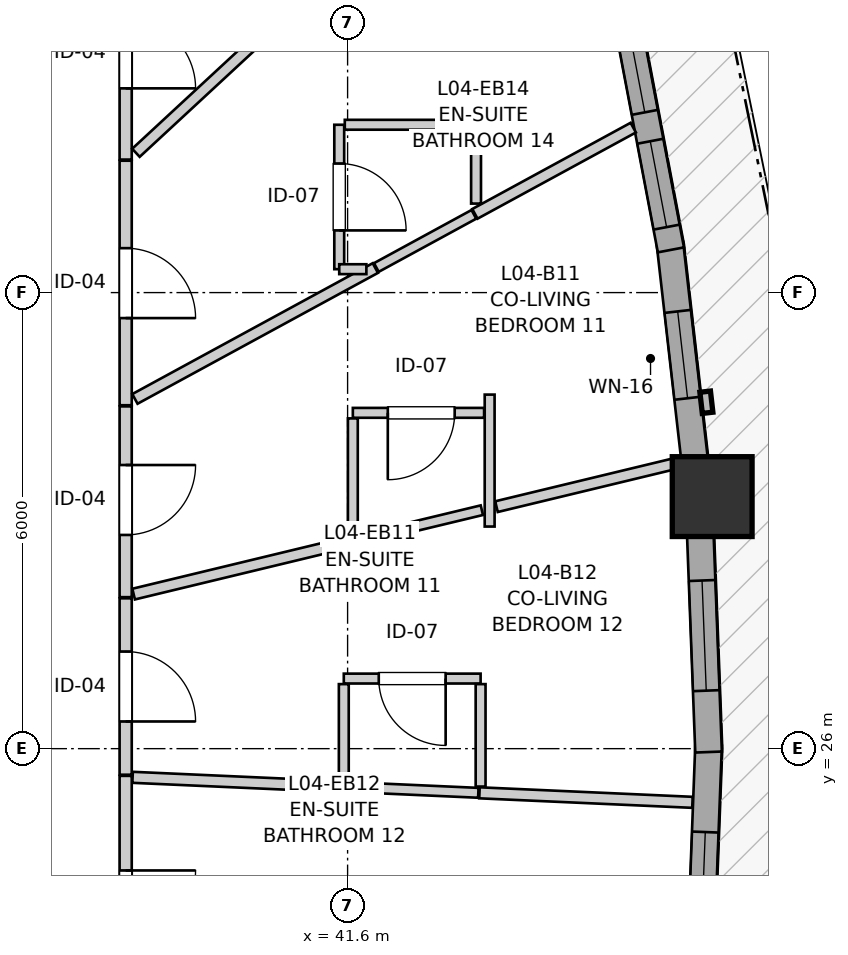
"""IFC4 building model, lengths in metres.
Left out: names, types, materials, properties, quantities, classifications, styles, units other than length and angle.
Written with IfcOpenShell. Run it as: python <this file> out.ifc"""

import sys

from ifc_helpers import new_model, si_unit, direction, frame, frame_2d, origin, origin_2d, place, context, subcontext, project, spatial, rectangle, extrude, source, transform, mapped, element, fill, save


model = new_model("IFC4")
c1 = context("Model", 3, precision=1e-05, world=origin(), true_north=direction((0.0, 1.0)))
c2 = subcontext(c1, "Body", "Model", "MODEL_VIEW")
j1 = project(units=[si_unit("LENGTHUNIT", "METRE"), si_unit("PLANEANGLEUNIT", "RADIAN")], contexts=[c1])
p1 = place(None, origin())
s1 = spatial("IfcSite", under=j1, at=p1, CompositionType="ELEMENT")
p2 = place(p1, origin())
s2 = spatial("IfcBuilding", under=s1, at=p2, CompositionType="ELEMENT")
p3 = place(p2, frame((0.0, 0.0, 17.4)))
s3 = spatial("IfcBuildingStorey", under=s2, at=p3, CompositionType="ELEMENT", Elevation=17.4)
m1 = source(origin(), c2, "Body", "SweptSolid", [
    extrude(rectangle(XDim=1.05, YDim=1.05, at=origin_2d()), origin(), (0.0, 0.0, 1.0), 2.94),
])
p4 = place(p3, frame((46.397, 29.316, 0.0), z_axis=(0.0, 0.0, 1.0), x_axis=(1.0, 0.0, 0.0)))
e1 = element("IfcColumn", 1, at=p4, inside=s3, PredefinedType="COLUMN", context=c2, shape_type="MappedRepresentation", body=[
    mapped(m1, transform((0.0, 0.0, 0.0), x_axis=(1.0, 0.0, 0.0), y_axis=(0.0, 1.0, 0.0), z_axis=(0.0, 0.0, 1.0), scale=1.0)),
])
p5 = place(p3, frame((46.223, 22.711, 0.0), z_axis=(0.0, 0.0, 1.0), x_axis=(0.037977854684, 0.999278581054, 0.0)))
e2 = element("IfcWall", 2, at=p5, inside=s3, PredefinedType="SOLIDWALL", context=c2, shape_type="SweptSolid", body=[
    extrude(rectangle(XDim=3.336, YDim=0.35, at=frame_2d((1.668, 0.0))), origin(), (0.0, 0.0, 1.0), 2.42),
])
p6 = place(p5, frame((0.444, 0.0, 0.82)))
e3 = element("IfcOpeningElement", 3, at=p6, cuts=e2, PredefinedType="OPENING", context=c2, shape_type="SweptSolid", body=[
    extrude(rectangle(XDim=1.75, YDim=1.3, at=frame_2d((0.875, 0.65))), frame((0.0, 0.185, 0.0), z_axis=(0.0, -1.0, 0.0), x_axis=(1.0, 0.0, 0.0)), (0.0, 0.0, 1.0), 0.37),
])
p7 = place(p3, frame((46.349, 25.955, 0.0), z_axis=(0.0, 0.0, 1.0), x_axis=(-0.038022046735, 0.999276900545, 0.0)))
e4 = element("IfcWall", 4, at=p7, inside=s3, PredefinedType="SOLIDWALL", context=c2, shape_type="SweptSolid", body=[
    extrude(rectangle(XDim=3.056, YDim=0.35, at=frame_2d((1.528, 0.0))), origin(), (0.0, 0.0, 1.0), 2.42),
])
p8 = place(p7, frame((0.808, 0.0, 0.82)))
e5 = element("IfcOpeningElement", 5, at=p8, cuts=e4, PredefinedType="OPENING", context=c2, shape_type="SweptSolid", body=[
    extrude(rectangle(XDim=1.45, YDim=1.25, at=frame_2d((0.725, 0.625))), frame((0.0, 0.185, 0.0), z_axis=(0.0, -1.0, 0.0), x_axis=(1.0, 0.0, 0.0)), (0.0, 0.0, 1.0), 0.37),
])
p9 = place(p3, frame((46.189, 29.594, 0.0), z_axis=(0.0, 0.0, 1.0), x_axis=(-0.113201797404, 0.99357201705, 0.0)))
e6 = element("IfcWall", 6, at=p9, inside=s3, PredefinedType="SOLIDWALL", context=c2, shape_type="SweptSolid", body=[
    extrude(rectangle(XDim=3.075, YDim=0.35, at=frame_2d((1.538, 0.0))), origin(), (0.0, 0.0, 1.0), 2.42),
])
p10 = place(p9, frame((1.022, 0.0, 0.82)))
e7 = element("IfcOpeningElement", 7, at=p10, cuts=e6, PredefinedType="OPENING", context=c2, shape_type="SweptSolid", body=[
    extrude(rectangle(XDim=1.15, YDim=1.2, at=frame_2d((0.575, 0.6))), frame((0.0, 0.185, 0.0), z_axis=(0.0, -1.0, 0.0), x_axis=(1.0, 0.0, 0.0)), (0.0, 0.0, 1.0), 0.37),
])
p11 = place(p3, frame((45.854, 32.562, 0.0), z_axis=(0.0, 0.0, 1.0), x_axis=(-0.186698837055, 0.982417194598, 0.0)))
e8 = element("IfcWall", 8, at=p11, inside=s3, PredefinedType="SOLIDWALL", context=c2, shape_type="SweptSolid", body=[
    extrude(rectangle(XDim=3.393, YDim=0.35, at=frame_2d((1.697, 0.0))), origin(), (0.0, 0.0, 1.0), 2.42),
])
p12 = place(p11, frame((0.305, 0.0, 0.82)))
e9 = element("IfcOpeningElement", 9, at=p12, cuts=e8, PredefinedType="OPENING", context=c2, shape_type="SweptSolid", body=[
    extrude(rectangle(XDim=1.15, YDim=1.2, at=frame_2d((0.575, 0.6))), frame((0.0, 0.185, 0.0), z_axis=(0.0, -1.0, 0.0), x_axis=(1.0, 0.0, 0.0)), (0.0, 0.0, 1.0), 0.37),
])
p13 = place(p11, frame((1.842, 0.0, 0.82)))
e10 = element("IfcOpeningElement", 10, at=p13, cuts=e8, PredefinedType="OPENING", context=c2, shape_type="SweptSolid", body=[
    extrude(rectangle(XDim=1.25, YDim=1.35, at=frame_2d((0.625, 0.675))), frame((0.0, 0.185, 0.0), z_axis=(0.0, -1.0, 0.0), x_axis=(1.0, 0.0, 0.0)), (0.0, 0.0, 1.0), 0.37),
])
p14 = place(p3, frame((38.68, 25.642, 0.0), z_axis=(0.0, 0.0, 1.0), x_axis=(0.0, -1.0, 0.0)))
e11 = element("IfcWall", 11, at=p14, inside=s3, PredefinedType="PARTITIONING", context=c2, shape_type="SweptSolid", body=[
    extrude(rectangle(XDim=3.363, YDim=0.16, at=frame_2d((1.682, 0.0))), origin(), (0.0, 0.0, 1.0), 2.94),
])
p15 = place(p14, frame((1.244, 0.0, 0.0)))
e12 = element("IfcOpeningElement", 12, at=p15, cuts=e11, PredefinedType="OPENING", context=c2, shape_type="SweptSolid", body=[
    extrude(rectangle(XDim=0.92, YDim=2.1, at=frame_2d((0.46, 1.05))), frame((0.0, 0.09, 0.0), z_axis=(0.0, -1.0, 0.0), x_axis=(1.0, 0.0, 0.0)), (0.0, 0.0, 1.0), 0.18),
])
p16 = place(p3, frame((38.68, 33.735, 0.0), z_axis=(0.0, 0.0, 1.0), x_axis=(0.0, -1.0, 0.0)))
e13 = element("IfcWall", 13, at=p16, inside=s3, PredefinedType="PARTITIONING", context=c2, shape_type="SweptSolid", body=[
    extrude(rectangle(XDim=3.217, YDim=0.16, at=frame_2d((1.608, 0.0))), origin(), (0.0, 0.0, 1.0), 2.94),
])
p17 = place(p16, frame((1.15, 0.0, 0.0)))
e14 = element("IfcOpeningElement", 14, at=p17, cuts=e13, PredefinedType="OPENING", context=c2, shape_type="SweptSolid", body=[
    extrude(rectangle(XDim=0.92, YDim=2.1, at=frame_2d((0.46, 1.05))), frame((0.0, 0.09, 0.0), z_axis=(0.0, -1.0, 0.0), x_axis=(1.0, 0.0, 0.0)), (0.0, 0.0, 1.0), 0.18),
])
p18 = place(p3, frame((38.68, 36.58, 0.0), z_axis=(0.0, 0.0, 1.0), x_axis=(0.0, -1.0, 0.0)))
e15 = element("IfcWall", 15, at=p18, inside=s3, PredefinedType="PARTITIONING", context=c2, shape_type="SweptSolid", body=[
    extrude(rectangle(XDim=2.83, YDim=0.16, at=frame_2d((1.415, 0.0))), origin(), (0.0, 0.0, 1.0), 2.94),
])
p19 = place(p18, frame((0.973, 0.0, 0.0)))
e16 = element("IfcOpeningElement", 16, at=p19, cuts=e15, PredefinedType="OPENING", context=c2, shape_type="SweptSolid", body=[
    extrude(rectangle(XDim=0.92, YDim=2.1, at=frame_2d((0.46, 1.05))), frame((0.0, 0.09, 0.0), z_axis=(0.0, -1.0, 0.0), x_axis=(1.0, 0.0, 0.0)), (0.0, 0.0, 1.0), 0.18),
])
p20 = place(p3, frame((38.68, 30.503, 0.0), z_axis=(0.0, 0.0, 1.0), x_axis=(0.0, -1.0, 0.0)))
e17 = element("IfcWall", 17, at=p20, inside=s3, PredefinedType="PARTITIONING", context=c2, shape_type="SweptSolid", body=[
    extrude(rectangle(XDim=2.51, YDim=0.16, at=frame_2d((1.255, 0.0))), origin(), (0.0, 0.0, 1.0), 2.94),
])
p21 = place(p20, frame((0.771, 0.0, 0.0)))
e18 = element("IfcOpeningElement", 18, at=p21, cuts=e17, PredefinedType="OPENING", context=c2, shape_type="SweptSolid", body=[
    extrude(rectangle(XDim=0.92, YDim=2.1, at=frame_2d((0.46, 1.05))), frame((0.0, 0.09, 0.0), z_axis=(0.0, -1.0, 0.0), x_axis=(1.0, 0.0, 0.0)), (0.0, 0.0, 1.0), 0.18),
])
p22 = place(p3, frame((38.68, 27.978, 0.0), z_axis=(0.0, 0.0, 1.0), x_axis=(0.0, -1.0, 0.0)))
e19 = element("IfcWall", 19, at=p22, inside=s3, PredefinedType="PARTITIONING", context=c2, shape_type="SweptSolid", body=[
    extrude(rectangle(XDim=2.321, YDim=0.16, at=frame_2d((1.161, 0.0))), origin(), (0.0, 0.0, 1.0), 2.94),
])
p23 = place(p22, frame((0.7, 0.0, 0.0)))
e20 = element("IfcOpeningElement", 20, at=p23, cuts=e19, PredefinedType="OPENING", context=c2, shape_type="SweptSolid", body=[
    extrude(rectangle(XDim=0.92, YDim=2.1, at=frame_2d((0.46, 1.05))), frame((0.0, 0.09, 0.0), z_axis=(0.0, -1.0, 0.0), x_axis=(1.0, 0.0, 0.0)), (0.0, 0.0, 1.0), 0.18),
])
p24 = place(p3, frame((41.49, 34.208, 0.0), z_axis=(0.0, 0.0, 1.0), x_axis=(0.0, -1.0, 0.0)))
e21 = element("IfcWall", 21, at=p24, inside=s3, PredefinedType="PARTITIONING", context=c2, shape_type="SweptSolid", body=[
    extrude(rectangle(XDim=1.9, YDim=0.13, at=frame_2d((0.95, 0.0))), origin(), (0.0, 0.0, 1.0), 2.94),
])
p25 = place(p24, frame((0.51, 0.0, 0.0)))
e22 = element("IfcOpeningElement", 22, at=p25, cuts=e21, PredefinedType="OPENING", context=c2, shape_type="SweptSolid", body=[
    extrude(rectangle(XDim=0.88, YDim=2.05, at=frame_2d((0.44, 1.025))), frame((0.0, 0.075, 0.0), z_axis=(0.0, -1.0, 0.0), x_axis=(1.0, 0.0, 0.0)), (0.0, 0.0, 1.0), 0.15),
])
p26 = place(p3, frame((43.396, 30.418, 0.0), z_axis=(0.0, 0.0, 1.0), x_axis=(-1.0, 0.0, 0.0)))
e23 = element("IfcWall", 23, at=p26, inside=s3, PredefinedType="PARTITIONING", context=c2, shape_type="SweptSolid", body=[
    extrude(rectangle(XDim=1.727, YDim=0.13, at=frame_2d((0.864, 0.0))), origin(), (0.0, 0.0, 1.0), 2.94),
])
p27 = place(p26, frame((0.387, 0.0, 0.0)))
e24 = element("IfcOpeningElement", 24, at=p27, cuts=e23, PredefinedType="OPENING", context=c2, shape_type="SweptSolid", body=[
    extrude(rectangle(XDim=0.88, YDim=2.05, at=frame_2d((0.44, 1.025))), frame((0.0, 0.075, 0.0), z_axis=(0.0, -1.0, 0.0), x_axis=(1.0, 0.0, 0.0)), (0.0, 0.0, 1.0), 0.15),
])
p28 = place(p3, frame((43.35, 26.922, 0.0), z_axis=(0.0, 0.0, 1.0), x_axis=(-1.0, 0.0, 0.0)))
e25 = element("IfcWall", 25, at=p28, inside=s3, PredefinedType="PARTITIONING", context=c2, shape_type="SweptSolid", body=[
    extrude(rectangle(XDim=1.8, YDim=0.13, at=frame_2d((0.9, 0.0))), origin(), (0.0, 0.0, 1.0), 2.94),
])
p29 = place(p28, frame((0.46, 0.0, 0.0)))
e26 = element("IfcOpeningElement", 26, at=p29, cuts=e25, PredefinedType="OPENING", context=c2, shape_type="SweptSolid", body=[
    extrude(rectangle(XDim=0.88, YDim=2.05, at=frame_2d((0.44, 1.025))), frame((0.0, 0.075, 0.0), z_axis=(0.0, -1.0, 0.0), x_axis=(1.0, 0.0, 0.0)), (0.0, 0.0, 1.0), 0.15),
])
p30 = place(p3, frame((38.815, 33.839, 0.0), z_axis=(0.0, 0.0, 1.0), x_axis=(0.733718730688, 0.67945332749, 0.0)))
e27 = element("IfcWall", 27, at=p30, inside=s3, PredefinedType="PARTITIONING", context=c2, shape_type="SweptSolid", body=[
    extrude(rectangle(XDim=3.869, YDim=0.145, at=frame_2d((1.935, 0.0))), origin(), (0.0, 0.0, 1.0), 2.94),
])
p31 = place(p3, frame((38.802, 30.601, 0.0), z_axis=(0.0, 0.0, 1.0), x_axis=(0.878335610987, 0.478044510973, 0.0)))
e28 = element("IfcWall", 28, at=p31, inside=s3, PredefinedType="PARTITIONING", context=c2, shape_type="SweptSolid", body=[
    extrude(rectangle(XDim=3.602, YDim=0.145, at=frame_2d((1.801, 0.0))), origin(), (0.0, 0.0, 1.0), 2.94),
])
p32 = place(p3, frame((38.785, 28.033, 0.0), z_axis=(0.0, 0.0, 1.0), x_axis=(0.972108739033, 0.234530593943, 0.0)))
e29 = element("IfcWall", 29, at=p32, inside=s3, PredefinedType="PARTITIONING", context=c2, shape_type="SweptSolid", body=[
    extrude(rectangle(XDim=2.967, YDim=0.145, at=frame_2d((1.483, 0.0))), origin(), (0.0, 0.0, 1.0), 2.308),
])
p33 = place(p3, frame((38.771, 25.623, 0.0), z_axis=(0.0, 0.0, 1.0), x_axis=(0.999004404192, -0.044611662199, 0.0)))
e30 = element("IfcWall", 30, at=p33, inside=s3, PredefinedType="PARTITIONING", context=c2, shape_type="SweptSolid", body=[
    extrude(rectangle(XDim=2.796, YDim=0.145, at=frame_2d((1.398, 0.0))), origin(), (0.0, 0.0, 1.0), 2.94),
])
p34 = place(p3, frame((43.335, 25.419, 0.0), z_axis=(0.0, 0.0, 1.0), x_axis=(0.999002708223, -0.04464962444, 0.0)))
e31 = element("IfcWall", 31, at=p34, inside=s3, PredefinedType="PARTITIONING", context=c2, shape_type="SweptSolid", body=[
    extrude(rectangle(XDim=2.805, YDim=0.145, at=frame_2d((1.402, 0.0))), origin(), (0.0, 0.0, 1.0), 2.94),
])
p35 = place(p3, frame((43.559, 29.184, 0.0), z_axis=(0.0, 0.0, 1.0), x_axis=(0.972124665715, 0.23446456941, 0.0)))
e32 = element("IfcWall", 32, at=p35, inside=s3, PredefinedType="PARTITIONING", context=c2, shape_type="SweptSolid", body=[
    extrude(rectangle(XDim=2.487, YDim=0.145, at=frame_2d((1.243, 0.0))), origin(), (0.0, 0.0, 1.0), 2.94),
])
p36 = place(p3, frame((43.275, 33.036, 0.0), z_axis=(0.0, 0.0, 1.0), x_axis=(0.878237509553, 0.478224713721, 0.0)))
e33 = element("IfcWall", 33, at=p36, inside=s3, PredefinedType="PARTITIONING", context=c2, shape_type="SweptSolid", body=[
    extrude(rectangle(XDim=2.372, YDim=0.145, at=frame_2d((1.186, 0.0))), origin(), (0.0, 0.0, 1.0), 2.94),
])
p37 = place(p3, frame((41.684, 28.732, 0.0), z_axis=(0.0, 0.0, 1.0), x_axis=(0.972269386076, 0.233863722924, 0.0)))
e34 = element("IfcWall", 34, at=p37, inside=s3, PredefinedType="PARTITIONING", context=c2, shape_type="SweptSolid", body=[
    extrude(rectangle(XDim=1.731, YDim=0.13, at=frame_2d((0.865, 0.0))), origin(), (0.0, 0.0, 1.0), 2.94),
])
p38 = place(p3, frame((41.563, 34.208, 0.0), z_axis=(0.0, 0.0, 1.0), x_axis=(1.0, 0.0, 0.0)))
e35 = element("IfcWall", 35, at=p38, inside=s3, PredefinedType="PARTITIONING", context=c2, shape_type="SweptSolid", body=[
    extrude(rectangle(XDim=1.727, YDim=0.13, at=frame_2d((0.864, 0.0))), origin(), (0.0, 0.0, 1.0), 2.94),
])
p39 = place(p3, frame((41.58, 25.497, 0.0), z_axis=(0.0, 0.0, 1.0), x_axis=(0.998993531001, -0.04485448715, 0.0)))
e36 = element("IfcWall", 36, at=p39, inside=s3, PredefinedType="PARTITIONING", context=c2, shape_type="SweptSolid", body=[
    extrude(rectangle(XDim=1.742, YDim=0.13, at=frame_2d((0.871, 0.0))), origin(), (0.0, 0.0, 1.0), 2.94),
])
p40 = place(p3, frame((41.669, 28.827, 0.0), z_axis=(0.0, 0.0, 1.0), x_axis=(0.0, 1.0, 0.0)))
e37 = element("IfcWall", 37, at=p40, inside=s3, PredefinedType="PARTITIONING", context=c2, shape_type="SweptSolid", body=[
    extrude(rectangle(XDim=1.518, YDim=0.13, at=frame_2d((0.759, 0.0))), origin(), (0.0, 0.0, 1.0), 2.94),
])
p41 = place(p3, frame((43.35, 25.501, 0.0), z_axis=(0.0, 0.0, 1.0), x_axis=(0.0, 1.0, 0.0)))
e38 = element("IfcWall", 38, at=p41, inside=s3, PredefinedType="PARTITIONING", context=c2, shape_type="SweptSolid", body=[
    extrude(rectangle(XDim=1.348, YDim=0.13, at=frame_2d((0.674, 0.0))), origin(), (0.0, 0.0, 1.0), 2.508),
])
p42 = place(p3, frame((41.978, 32.33, 0.0), z_axis=(0.0, 0.0, 1.0), x_axis=(0.878138043068, 0.478407334097, 0.0)))
e39 = element("IfcWall", 39, at=p42, inside=s3, PredefinedType="PARTITIONING", context=c2, shape_type="SweptSolid", body=[
    extrude(rectangle(XDim=1.462, YDim=0.13, at=frame_2d((0.731, 0.0))), origin(), (0.0, 0.0, 1.0), 2.94),
])
p43 = place(p3, frame((41.55, 25.583, 0.0), z_axis=(0.0, 0.0, 1.0), x_axis=(0.0, 1.0, 0.0)))
e40 = element("IfcWall", 40, at=p43, inside=s3, PredefinedType="PARTITIONING", context=c2, shape_type="SweptSolid", body=[
    extrude(rectangle(XDim=1.267, YDim=0.13, at=frame_2d((0.633, 0.0))), origin(), (0.0, 0.0, 1.0), 2.94),
])
p44 = place(p3, frame((43.469, 28.922, 0.0), z_axis=(0.0, 0.0, 1.0), x_axis=(0.0, 1.0, 0.0)))
e41 = element("IfcWall", 41, at=p44, inside=s3, PredefinedType="PARTITIONING", context=c2, shape_type="SweptSolid", body=[
    extrude(rectangle(XDim=1.736, YDim=0.13, at=frame_2d((0.868, 0.0))), origin(), (0.0, 0.0, 1.0), 2.508),
])
p45 = place(p3, frame((43.29, 33.171, 0.0), z_axis=(0.0, 0.0, 1.0), x_axis=(0.0, 1.0, 0.0)))
e42 = element("IfcWall", 42, at=p45, inside=s3, PredefinedType="PARTITIONING", context=c2, shape_type="SweptSolid", body=[
    extrude(rectangle(XDim=0.964, YDim=0.13, at=frame_2d((0.482, 0.0))), origin(), (0.0, 0.0, 1.0), 2.94),
])
p46 = place(p3, frame((41.49, 32.308, 0.0), z_axis=(0.0, 0.0, 1.0), x_axis=(1.0, 0.0, 0.0)))
e43 = element("IfcWall", 43, at=p46, inside=s3, PredefinedType="PARTITIONING", context=c2, shape_type="SweptSolid", body=[
    extrude(rectangle(XDim=0.357, YDim=0.13, at=frame_2d((0.178, 0.0))), origin(), (0.0, 0.0, 1.0), 2.94),
])
m2 = source(origin(), c2, "Body", "SweptSolid", [
    extrude(rectangle(XDim=1.75, YDim=1.3, at=frame_2d((0.875, 0.65))), frame((0.0, 0.03, 0.0), z_axis=(0.0, -1.0, 0.0), x_axis=(1.0, 0.0, 0.0)), (0.0, 0.0, 1.0), 0.06),
])
p47 = place(p6, origin())
e44 = element("IfcWindow", 44, at=p47, inside=s3, PartitioningType="SINGLE_PANEL", PredefinedType="WINDOW", context=c2, shape_type="MappedRepresentation", body=[
    mapped(m2, transform((0.0, 0.0, 0.0), x_axis=(1.0, 0.0, 0.0), y_axis=(0.0, 1.0, 0.0), z_axis=(0.0, 0.0, 1.0), scale=1.0)),
])
fill(e3, e44)
m3 = source(origin(), c2, "Body", "SweptSolid", [
    extrude(rectangle(XDim=1.45, YDim=1.25, at=frame_2d((0.725, 0.625))), frame((0.0, 0.03, 0.0), z_axis=(0.0, -1.0, 0.0), x_axis=(1.0, 0.0, 0.0)), (0.0, 0.0, 1.0), 0.06),
])
p48 = place(p8, origin())
e45 = element("IfcWindow", 45, at=p48, inside=s3, PartitioningType="SINGLE_PANEL", PredefinedType="WINDOW", context=c2, shape_type="MappedRepresentation", body=[
    mapped(m3, transform((0.0, 0.0, 0.0), x_axis=(1.0, 0.0, 0.0), y_axis=(0.0, 1.0, 0.0), z_axis=(0.0, 0.0, 1.0), scale=1.0)),
])
fill(e5, e45)
m4 = source(origin(), c2, "Body", "SweptSolid", [
    extrude(rectangle(XDim=1.15, YDim=1.2, at=frame_2d((0.575, 0.6))), frame((0.0, 0.03, 0.0), z_axis=(0.0, -1.0, 0.0), x_axis=(1.0, 0.0, 0.0)), (0.0, 0.0, 1.0), 0.06),
])
p49 = place(p10, origin())
e46 = element("IfcWindow", 46, at=p49, inside=s3, PartitioningType="SINGLE_PANEL", PredefinedType="WINDOW", context=c2, shape_type="MappedRepresentation", body=[
    mapped(m4, transform((0.0, 0.0, 0.0), x_axis=(1.0, 0.0, 0.0), y_axis=(0.0, 1.0, 0.0), z_axis=(0.0, 0.0, 1.0), scale=1.0)),
])
fill(e7, e46)
p50 = place(p12, origin())
e47 = element("IfcWindow", 47, at=p50, inside=s3, PartitioningType="SINGLE_PANEL", PredefinedType="WINDOW", context=c2, shape_type="MappedRepresentation", body=[
    mapped(m4, transform((0.0, 0.0, 0.0), x_axis=(1.0, 0.0, 0.0), y_axis=(0.0, 1.0, 0.0), z_axis=(0.0, 0.0, 1.0), scale=1.0)),
])
fill(e9, e47)
m5 = source(origin(), c2, "Body", "SweptSolid", [
    extrude(rectangle(XDim=1.25, YDim=1.35, at=frame_2d((0.625, 0.675))), frame((0.0, 0.03, 0.0), z_axis=(0.0, -1.0, 0.0), x_axis=(1.0, 0.0, 0.0)), (0.0, 0.0, 1.0), 0.06),
])
p51 = place(p13, origin())
e48 = element("IfcWindow", 48, at=p51, inside=s3, PartitioningType="SINGLE_PANEL", PredefinedType="WINDOW", context=c2, shape_type="MappedRepresentation", body=[
    mapped(m5, transform((0.0, 0.0, 0.0), x_axis=(1.0, 0.0, 0.0), y_axis=(0.0, 1.0, 0.0), z_axis=(0.0, 0.0, 1.0), scale=1.0)),
])
fill(e10, e48)
m6 = source(origin(), c2, "Body", "SweptSolid", [
    extrude(rectangle(XDim=0.92, YDim=2.1, at=frame_2d((0.46, 1.05))), frame((0.0, 0.025, 0.0), z_axis=(0.0, -1.0, 0.0), x_axis=(1.0, 0.0, 0.0)), (0.0, 0.0, 1.0), 0.05),
])
p52 = place(p15, origin())
e49 = element("IfcDoor", 49, at=p52, inside=s3, OperationType="SINGLE_SWING_LEFT", PredefinedType="DOOR", context=c2, shape_type="MappedRepresentation", body=[
    mapped(m6, transform((0.0, 0.0, 0.0), x_axis=(1.0, 0.0, 0.0), y_axis=(0.0, 1.0, 0.0), z_axis=(0.0, 0.0, 1.0), scale=1.0)),
])
fill(e12, e49)
p53 = place(p17, origin())
e50 = element("IfcDoor", 50, at=p53, inside=s3, OperationType="SINGLE_SWING_RIGHT", PredefinedType="DOOR", context=c2, shape_type="MappedRepresentation", body=[
    mapped(m6, transform((0.0, 0.0, 0.0), x_axis=(1.0, 0.0, 0.0), y_axis=(0.0, 1.0, 0.0), z_axis=(0.0, 0.0, 1.0), scale=1.0)),
])
fill(e14, e50)
p54 = place(p19, origin())
e51 = element("IfcDoor", 51, at=p54, inside=s3, OperationType="SINGLE_SWING_RIGHT", PredefinedType="DOOR", context=c2, shape_type="MappedRepresentation", body=[
    mapped(m6, transform((0.0, 0.0, 0.0), x_axis=(1.0, 0.0, 0.0), y_axis=(0.0, 1.0, 0.0), z_axis=(0.0, 0.0, 1.0), scale=1.0)),
])
fill(e16, e51)
p55 = place(p21, origin())
e52 = element("IfcDoor", 52, at=p55, inside=s3, OperationType="SINGLE_SWING_LEFT", PredefinedType="DOOR", context=c2, shape_type="MappedRepresentation", body=[
    mapped(m6, transform((0.0, 0.0, 0.0), x_axis=(1.0, 0.0, 0.0), y_axis=(0.0, 1.0, 0.0), z_axis=(0.0, 0.0, 1.0), scale=1.0)),
])
fill(e18, e52)
p56 = place(p23, origin())
e53 = element("IfcDoor", 53, at=p56, inside=s3, OperationType="SINGLE_SWING_RIGHT", PredefinedType="DOOR", context=c2, shape_type="MappedRepresentation", body=[
    mapped(m6, transform((0.0, 0.0, 0.0), x_axis=(1.0, 0.0, 0.0), y_axis=(0.0, 1.0, 0.0), z_axis=(0.0, 0.0, 1.0), scale=1.0)),
])
fill(e20, e53)
m7 = source(origin(), c2, "Body", "SweptSolid", [
    extrude(rectangle(XDim=0.88, YDim=2.05, at=frame_2d((0.44, 1.025))), frame((0.0, 0.025, 0.0), z_axis=(0.0, -1.0, 0.0), x_axis=(1.0, 0.0, 0.0)), (0.0, 0.0, 1.0), 0.05),
])
p57 = place(p25, origin())
e54 = element("IfcDoor", 54, at=p57, inside=s3, OperationType="SINGLE_SWING_RIGHT", PredefinedType="DOOR", context=c2, shape_type="MappedRepresentation", body=[
    mapped(m7, transform((0.0, 0.0, 0.0), x_axis=(1.0, 0.0, 0.0), y_axis=(0.0, 1.0, 0.0), z_axis=(0.0, 0.0, 1.0), scale=1.0)),
])
fill(e22, e54)
p58 = place(p27, origin())
e55 = element("IfcDoor", 55, at=p58, inside=s3, OperationType="SINGLE_SWING_RIGHT", PredefinedType="DOOR", context=c2, shape_type="MappedRepresentation", body=[
    mapped(m7, transform((0.0, 0.0, 0.0), x_axis=(1.0, 0.0, 0.0), y_axis=(0.0, 1.0, 0.0), z_axis=(0.0, 0.0, 1.0), scale=1.0)),
])
fill(e24, e55)
p59 = place(p29, origin())
e56 = element("IfcDoor", 56, at=p59, inside=s3, OperationType="SINGLE_SWING_LEFT", PredefinedType="DOOR", context=c2, shape_type="MappedRepresentation", body=[
    mapped(m7, transform((0.0, 0.0, 0.0), x_axis=(1.0, 0.0, 0.0), y_axis=(0.0, 1.0, 0.0), z_axis=(0.0, 0.0, 1.0), scale=1.0)),
])
fill(e26, e56)
save(model, sys.argv[1])
